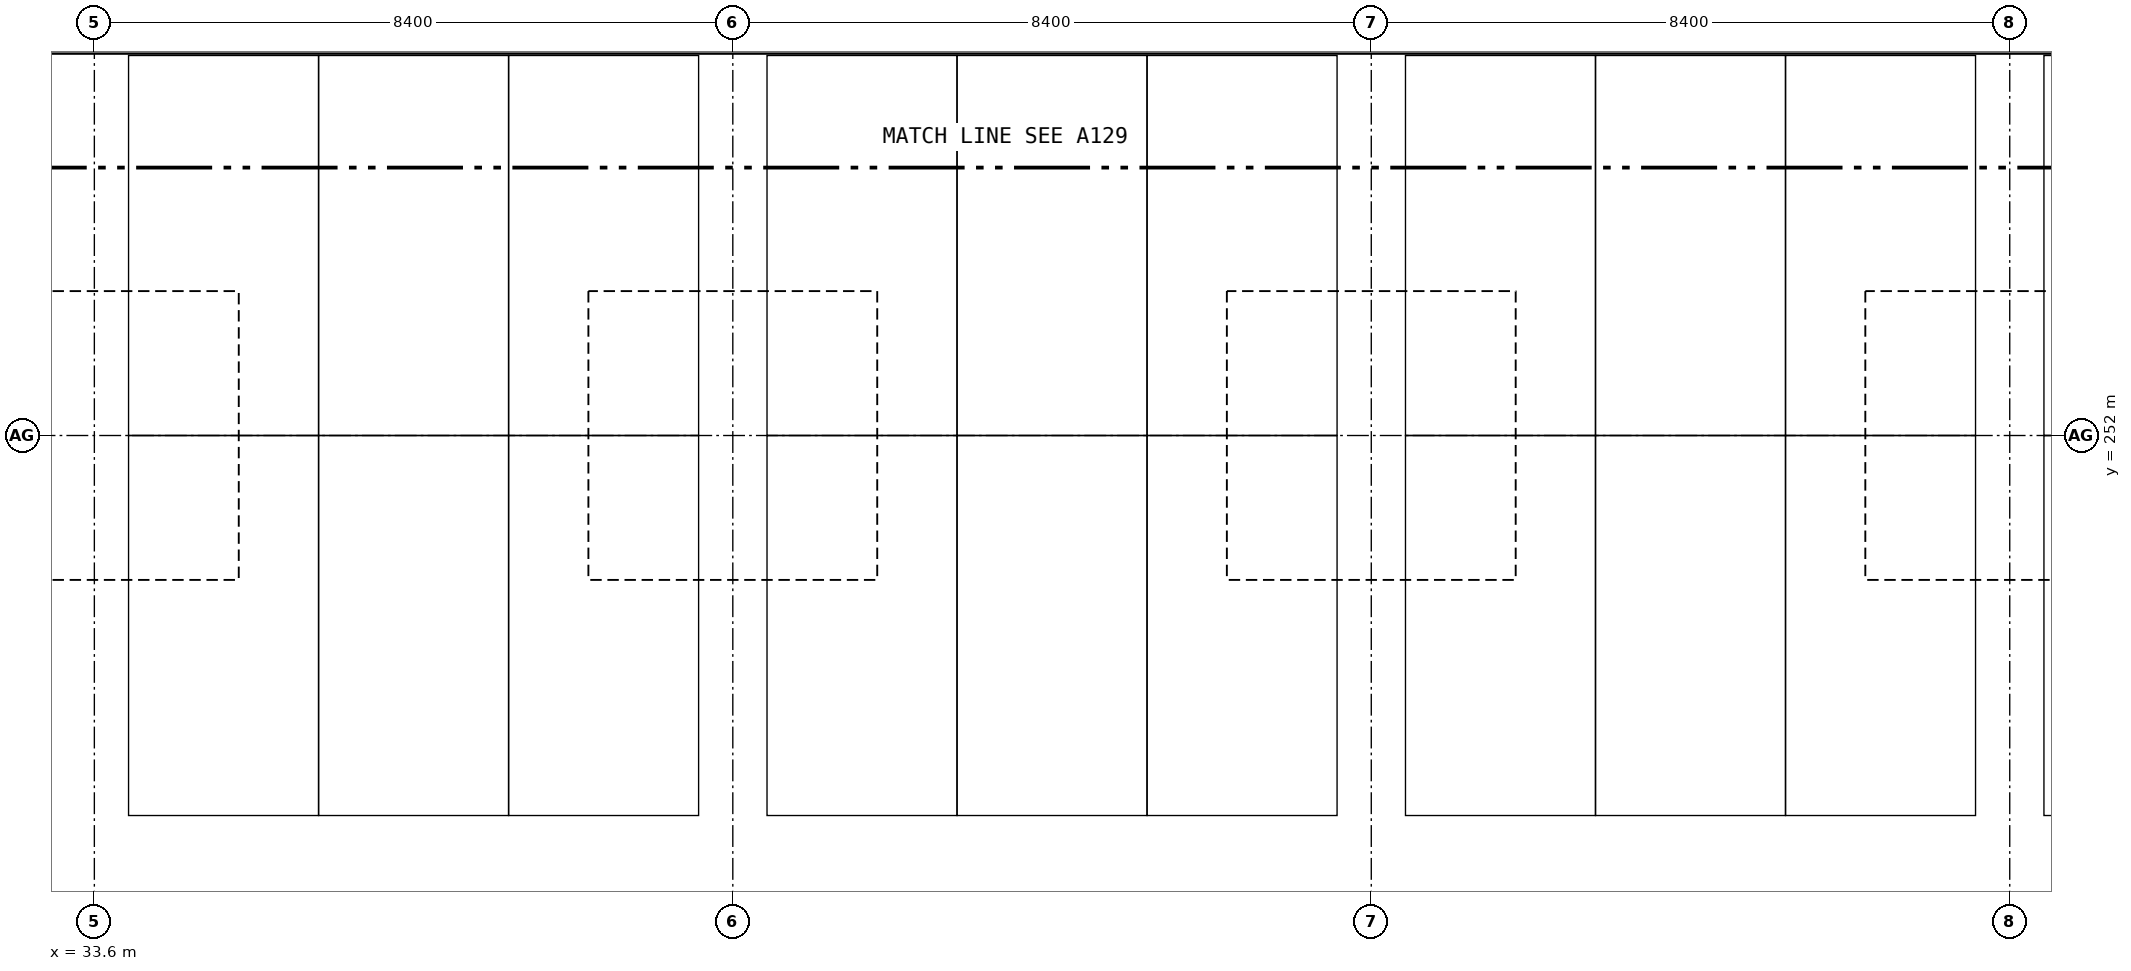
"""IFC4 building model, lengths in metres.
Left out: names, types, materials, properties, quantities, classifications, styles, units other than length and angle.
Written with IfcOpenShell. Run it as: python <this file> out.ifc"""

import sys

from ifc_helpers import new_model, si_unit, direction, frame, origin, origin_2d, place, context, subcontext, project, spatial, rectangle, extrude, element, save


model = new_model("IFC4")
c1 = context("Model", 3, precision=1e-05, world=origin(), true_north=direction((0.0, 1.0)))
c2 = subcontext(c1, "Body", "Model", "MODEL_VIEW")
j1 = project(units=[si_unit("LENGTHUNIT", "METRE"), si_unit("PLANEANGLEUNIT", "RADIAN")], contexts=[c1])
p1 = place(None, origin())
s1 = spatial("IfcSite", under=j1, at=p1, CompositionType="ELEMENT")
p2 = place(p1, origin())
s2 = spatial("IfcBuilding", under=s1, at=p2, CompositionType="ELEMENT")
p3 = place(p2, frame((0.0, 0.0, -3.0)))
s3 = spatial("IfcBuildingStorey", under=s2, at=p3, CompositionType="ELEMENT", Elevation=-3.0)
for number, where, z_axis, x_axis in (
    (1, (33.6, 252.0, 0.0), (0.0, 0.0, 1.0), (1.0, 0.0, 0.0)),
    (2, (42.0, 252.0, 0.0), (0.0, 0.0, 1.0), (1.0, 0.0, 0.0)),
    (3, (50.4, 252.0, 0.0), (0.0, 0.0, 1.0), (1.0, 0.0, 0.0)),
    (4, (58.8, 252.0, 0.0), (0.0, 0.0, 1.0), (1.0, 0.0, 0.0)),
):
    element("IfcColumn", number, at=place(p3, frame(where, z_axis=z_axis, x_axis=x_axis)), inside=s3, PredefinedType="COLUMN", context=c2, shape_type="SweptSolid", body=[
        extrude(rectangle(XDim=0.8, YDim=0.8, at=origin_2d()), origin(), (0.0, 0.0, 1.0), 2.4),
    ])
save(model, sys.argv[1])
